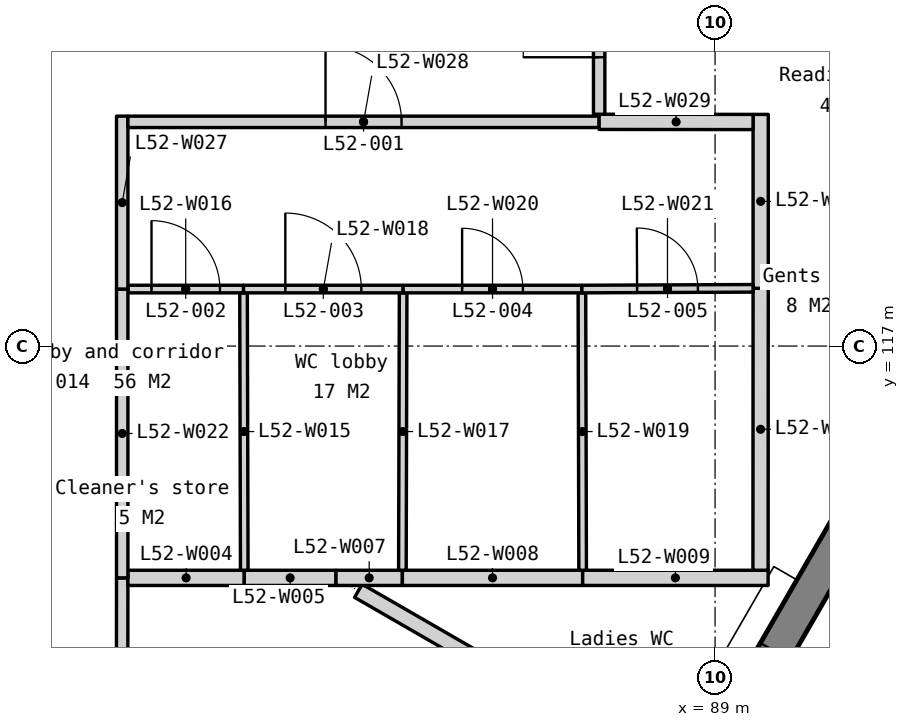
"""IFC4 building model, lengths in metres.
Left out: names, types, materials, properties, quantities, classifications, styles, units other than length and angle.
Written with IfcOpenShell. Run it as: python <this file> out.ifc"""

import sys

from ifc_helpers import new_model, si_unit, direction, frame, frame_2d, origin, place, context, subcontext, project, spatial, polyline, rectangle, outline, extrude, element, fill, save


model = new_model("IFC4")
c1 = context("Model", 3, precision=1e-05, world=origin(), true_north=direction((0.0, 1.0)))
c2 = subcontext(c1, "Body", "Model", "MODEL_VIEW")
j1 = project(units=[si_unit("LENGTHUNIT", "METRE"), si_unit("PLANEANGLEUNIT", "RADIAN")], contexts=[c1])
p1 = place(None, origin())
s1 = spatial("IfcSite", under=j1, at=p1, CompositionType="ELEMENT")
p2 = place(p1, origin())
s2 = spatial("IfcBuilding", under=s1, at=p2, CompositionType="ELEMENT")
p3 = place(p2, frame((0.0, 0.0, 207.5)))
s3 = spatial("IfcBuildingStorey", under=s2, at=p3, CompositionType="ELEMENT", Elevation=207.5)
p4 = place(p3, frame((81.505, 98.627, -0.15), z_axis=(0.0, 0.0, 1.0), x_axis=(0.500002199942, 0.866024133644, 0.0)))
e1 = element("IfcWall", 1, at=p4, inside=s3, PredefinedType="SOLIDWALL", context=c2, shape_type="SweptSolid", body=[
    extrude(outline(polyline([(38.729, 0.0), (38.729, 3.9), (0.0, 3.9), (0.0, 0.0), (38.729, 0.0)])), frame((0.0, 0.225, 0.0), z_axis=(0.0, -1.0, 0.0), x_axis=(1.0, 0.0, 0.0)), (0.0, 0.0, 1.0), 0.45),
])
p5 = place(p4, frame((2.791, 0.0, 0.95)))
e2 = element("IfcOpeningElement", 2, at=p5, cuts=e1, PredefinedType="OPENING", context=c2, shape_type="SweptSolid", body=[
    extrude(rectangle(XDim=1.8, YDim=2.2, at=frame_2d((0.9, 1.1))), frame((0.0, 0.235, 0.0), z_axis=(0.0, -1.0, 0.0), x_axis=(1.0, 0.0, 0.0)), (0.0, 0.0, 1.0), 0.47),
])
p6 = place(p4, frame((5.091, 0.0, 0.95)))
e3 = element("IfcOpeningElement", 3, at=p6, cuts=e1, PredefinedType="OPENING", context=c2, shape_type="SweptSolid", body=[
    extrude(rectangle(XDim=1.8, YDim=2.2, at=frame_2d((0.9, 1.1))), frame((0.0, 0.235, 0.0), z_axis=(0.0, -1.0, 0.0), x_axis=(1.0, 0.0, 0.0)), (0.0, 0.0, 1.0), 0.47),
])
p7 = place(p4, frame((12.473, 0.0, 0.95)))
e4 = element("IfcOpeningElement", 4, at=p7, cuts=e1, PredefinedType="OPENING", context=c2, shape_type="SweptSolid", body=[
    extrude(rectangle(XDim=1.8, YDim=2.2, at=frame_2d((0.9, 1.1))), frame((0.0, 0.235, 0.0), z_axis=(0.0, -1.0, 0.0), x_axis=(1.0, 0.0, 0.0)), (0.0, 0.0, 1.0), 0.47),
])
p8 = place(p4, frame((14.773, 0.0, 0.95)))
e5 = element("IfcOpeningElement", 5, at=p8, cuts=e1, PredefinedType="OPENING", context=c2, shape_type="SweptSolid", body=[
    extrude(rectangle(XDim=1.8, YDim=2.2, at=frame_2d((0.9, 1.1))), frame((0.0, 0.235, 0.0), z_axis=(0.0, -1.0, 0.0), x_axis=(1.0, 0.0, 0.0)), (0.0, 0.0, 1.0), 0.47),
])
p9 = place(p4, frame((22.156, 0.0, 0.95)))
e6 = element("IfcOpeningElement", 6, at=p9, cuts=e1, PredefinedType="OPENING", context=c2, shape_type="SweptSolid", body=[
    extrude(rectangle(XDim=1.8, YDim=2.2, at=frame_2d((0.9, 1.1))), frame((0.0, 0.235, 0.0), z_axis=(0.0, -1.0, 0.0), x_axis=(1.0, 0.0, 0.0)), (0.0, 0.0, 1.0), 0.47),
])
p10 = place(p4, frame((24.456, 0.0, 0.95)))
e7 = element("IfcOpeningElement", 7, at=p10, cuts=e1, PredefinedType="OPENING", context=c2, shape_type="SweptSolid", body=[
    extrude(rectangle(XDim=1.8, YDim=2.2, at=frame_2d((0.9, 1.1))), frame((0.0, 0.235, 0.0), z_axis=(0.0, -1.0, 0.0), x_axis=(1.0, 0.0, 0.0)), (0.0, 0.0, 1.0), 0.47),
])
p11 = place(p4, frame((31.838, 0.0, 0.95)))
e8 = element("IfcOpeningElement", 8, at=p11, cuts=e1, PredefinedType="OPENING", context=c2, shape_type="SweptSolid", body=[
    extrude(rectangle(XDim=1.8, YDim=2.2, at=frame_2d((0.9, 1.1))), frame((0.0, 0.235, 0.0), z_axis=(0.0, -1.0, 0.0), x_axis=(1.0, 0.0, 0.0)), (0.0, 0.0, 1.0), 0.47),
])
p12 = place(p4, frame((34.138, 0.0, 0.95)))
e9 = element("IfcOpeningElement", 9, at=p12, cuts=e1, PredefinedType="OPENING", context=c2, shape_type="SweptSolid", body=[
    extrude(rectangle(XDim=1.8, YDim=2.2, at=frame_2d((0.9, 1.1))), frame((0.0, 0.235, 0.0), z_axis=(0.0, -1.0, 0.0), x_axis=(1.0, 0.0, 0.0)), (0.0, 0.0, 1.0), 0.47),
])
p13 = place(p3, frame((81.198, 111.842, 0.0), z_axis=(0.0, 0.0, 1.0), x_axis=(0.000926461675, 0.999999570834, 0.0)))
e10 = element("IfcWall", 10, at=p13, inside=s3, PredefinedType="PARTITIONING", context=c2, shape_type="SweptSolid", body=[
    extrude(rectangle(XDim=2.108, YDim=0.15, at=frame_2d((1.054, 0.0))), origin(), (0.0, 0.0, 1.0), 3.75),
])
p14 = place(p3, frame((81.275, 113.95, 0.0), z_axis=(0.0, 0.0, 1.0), x_axis=(1.0, 0.0, 0.0)))
e11 = element("IfcWall", 11, at=p14, inside=s3, PredefinedType="PARTITIONING", context=c2, shape_type="SweptSolid", body=[
    extrude(rectangle(XDim=1.531, YDim=0.2, at=frame_2d((0.766, 0.0))), origin(), (0.0, 0.0, 1.0), 3.75),
])
p15 = place(p3, frame((82.806, 113.95, 0.0), z_axis=(0.0, 0.0, 1.0), x_axis=(1.0, 0.0, 0.0)))
e12 = element("IfcWall", 12, at=p15, inside=s3, PredefinedType="PARTITIONING", context=c2, shape_type="SweptSolid", body=[
    extrude(rectangle(XDim=1.207, YDim=0.2, at=frame_2d((0.604, 0.0))), origin(), (0.0, 0.0, 1.0), 3.75),
])
p16 = place(p3, frame((84.307, 113.78, 0.0), z_axis=(0.0, 0.0, 1.0), x_axis=(0.86601964755, -0.500009969958, 0.0)))
e13 = element("IfcWall", 13, at=p16, inside=s3, PredefinedType="PARTITIONING", context=c2, shape_type="SweptSolid", body=[
    extrude(rectangle(XDim=4.925, YDim=0.2, at=frame_2d((2.462, 0.0))), origin(), (0.0, 0.0, 1.0), 3.75),
])
p17 = place(p3, frame((84.013, 113.95, 0.0), z_axis=(0.0, 0.0, 1.0), x_axis=(1.0, 0.0, 0.0)))
e14 = element("IfcWall", 14, at=p17, inside=s3, PredefinedType="PARTITIONING", context=c2, shape_type="SweptSolid", body=[
    extrude(rectangle(XDim=0.873, YDim=0.2, at=frame_2d((0.437, 0.0))), origin(), (0.0, 0.0, 1.0), 3.75),
])
p18 = place(p3, frame((84.886, 113.95, 0.0), z_axis=(0.0, 0.0, 1.0), x_axis=(1.0, 0.0, 0.0)))
e15 = element("IfcWall", 15, at=p18, inside=s3, PredefinedType="PARTITIONING", context=c2, shape_type="SweptSolid", body=[
    extrude(rectangle(XDim=2.372, YDim=0.2, at=frame_2d((1.186, 0.0))), origin(), (0.0, 0.0, 1.0), 3.75),
])
p19 = place(p3, frame((87.258, 113.95, 0.0), z_axis=(0.0, 0.0, 1.0), x_axis=(1.0, 0.0, 0.0)))
e16 = element("IfcWall", 16, at=p19, inside=s3, PredefinedType="PARTITIONING", context=c2, shape_type="SweptSolid", body=[
    extrude(rectangle(XDim=2.44, YDim=0.2, at=frame_2d((1.22, 0.0))), origin(), (0.0, 0.0, 1.0), 3.75),
])
p20 = place(p3, frame((89.598, 114.05, 0.0), z_axis=(0.0, 0.0, 1.0), x_axis=(0.000526454257, 0.999999861423, 0.0)))
e17 = element("IfcWall", 17, at=p20, inside=s3, PredefinedType="PARTITIONING", context=c2, shape_type="SweptSolid", body=[
    extrude(rectangle(XDim=3.71, YDim=0.2, at=frame_2d((1.855, 0.0))), origin(), (0.0, 0.0, 1.0), 3.75),
])
p21 = place(p3, frame((89.6, 117.76, 0.0), z_axis=(0.0, 0.0, 1.0), x_axis=(0.0, 1.0, 0.0)))
e18 = element("IfcWall", 18, at=p21, inside=s3, PredefinedType="PARTITIONING", context=c2, shape_type="SweptSolid", body=[
    extrude(rectangle(XDim=2.288, YDim=0.2, at=frame_2d((1.144, 0.0))), origin(), (0.0, 0.0, 1.0), 3.75),
])
p22 = place(p3, frame((82.806, 114.05, 0.0), z_axis=(0.0, 0.0, 1.0), x_axis=(-0.002608686776, 0.999996597371, 0.0)))
e19 = element("IfcWall", 19, at=p22, inside=s3, PredefinedType="PARTITIONING", context=c2, shape_type="SweptSolid", body=[
    extrude(rectangle(XDim=3.65, YDim=0.1, at=frame_2d((1.825, 0.0))), origin(), (0.0, 0.0, 1.0), 3.75),
])
p23 = place(p3, frame((81.275, 117.75, 0.0), z_axis=(0.0, 0.0, 1.0), x_axis=(1.0, 0.0, 0.0)))
e20 = element("IfcWall", 20, at=p23, inside=s3, PredefinedType="PARTITIONING", context=c2, shape_type="SweptSolid", body=[
    extrude(rectangle(XDim=1.521, YDim=0.1, at=frame_2d((0.76, 0.0))), origin(), (0.0, 0.0, 1.0), 3.75),
])
p24 = place(p23, frame((0.311, 0.0, 0.0)))
e21 = element("IfcOpeningElement", 21, at=p24, cuts=e20, PredefinedType="OPENING", context=c2, shape_type="SweptSolid", body=[
    extrude(rectangle(XDim=0.9, YDim=2.1, at=frame_2d((0.45, 1.05))), frame((0.0, 0.06, 0.0), z_axis=(0.0, -1.0, 0.0), x_axis=(1.0, 0.0, 0.0)), (0.0, 0.0, 1.0), 0.12),
])
p25 = place(p3, frame((84.886, 114.05, 0.0), z_axis=(0.0, 0.0, 1.0), x_axis=(0.002608686776, 0.999996597371, 0.0)))
e22 = element("IfcWall", 22, at=p25, inside=s3, PredefinedType="PARTITIONING", context=c2, shape_type="SweptSolid", body=[
    extrude(rectangle(XDim=3.65, YDim=0.1, at=frame_2d((1.825, 0.0))), origin(), (0.0, 0.0, 1.0), 3.75),
])
p26 = place(p3, frame((82.796, 117.75, 0.0), z_axis=(0.0, 0.0, 1.0), x_axis=(1.0, 0.0, 0.0)))
e23 = element("IfcWall", 23, at=p26, inside=s3, PredefinedType="PARTITIONING", context=c2, shape_type="SweptSolid", body=[
    extrude(rectangle(XDim=2.1, YDim=0.1, at=frame_2d((1.05, 0.0))), origin(), (0.0, 0.0, 1.0), 3.75),
])
p27 = place(p26, frame((0.55, 0.0, 0.0)))
e24 = element("IfcOpeningElement", 24, at=p27, cuts=e23, PredefinedType="OPENING", context=c2, shape_type="SweptSolid", body=[
    extrude(rectangle(XDim=1.0, YDim=2.1, at=frame_2d((0.5, 1.05))), frame((0.0, 0.06, 0.0), z_axis=(0.0, -1.0, 0.0), x_axis=(1.0, 0.0, 0.0)), (0.0, 0.0, 1.0), 0.12),
])
p28 = place(p3, frame((87.258, 114.05, 0.0), z_axis=(0.0, 0.0, 1.0), x_axis=(-0.002675575707, 0.999996420641, 0.0)))
e25 = element("IfcWall", 25, at=p28, inside=s3, PredefinedType="PARTITIONING", context=c2, shape_type="SweptSolid", body=[
    extrude(rectangle(XDim=3.65, YDim=0.1, at=frame_2d((1.825, 0.0))), origin(), (0.0, 0.0, 1.0), 3.75),
])
p29 = place(p3, frame((84.896, 117.75, 0.0), z_axis=(0.0, 0.0, 1.0), x_axis=(1.0, 0.0, 0.0)))
e26 = element("IfcWall", 26, at=p29, inside=s3, PredefinedType="PARTITIONING", context=c2, shape_type="SweptSolid", body=[
    extrude(rectangle(XDim=2.352, YDim=0.1, at=frame_2d((1.176, 0.0))), origin(), (0.0, 0.0, 1.0), 3.75),
])
p30 = place(p29, frame((0.776, 0.0, 0.0)))
e27 = element("IfcOpeningElement", 27, at=p30, cuts=e26, PredefinedType="OPENING", context=c2, shape_type="SweptSolid", body=[
    extrude(rectangle(XDim=0.8, YDim=2.1, at=frame_2d((0.4, 1.05))), frame((0.0, 0.06, 0.0), z_axis=(0.0, -1.0, 0.0), x_axis=(1.0, 0.0, 0.0)), (0.0, 0.0, 1.0), 0.12),
])
p31 = place(p3, frame((87.248, 117.75, 0.0), z_axis=(0.0, 0.0, 1.0), x_axis=(0.999991061702, 0.004228062815, 0.0)))
e28 = element("IfcWall", 28, at=p31, inside=s3, PredefinedType="PARTITIONING", context=c2, shape_type="SweptSolid", body=[
    extrude(rectangle(XDim=2.252, YDim=0.1, at=frame_2d((1.126, 0.0))), origin(), (0.0, 0.0, 1.0), 3.75),
])
p32 = place(p31, frame((0.726, 0.0, 0.0)))
e29 = element("IfcOpeningElement", 29, at=p32, cuts=e28, PredefinedType="OPENING", context=c2, shape_type="SweptSolid", body=[
    extrude(rectangle(XDim=0.8, YDim=2.1, at=frame_2d((0.4, 1.05))), frame((0.0, 0.06, 0.0), z_axis=(0.0, -1.0, 0.0), x_axis=(1.0, 0.0, 0.0)), (0.0, 0.0, 1.0), 0.12),
])
p33 = place(p3, frame((81.2, 113.95, 0.0), z_axis=(0.0, 0.0, 1.0), x_axis=(0.0, 1.0, 0.0)))
e30 = element("IfcWall", 30, at=p33, inside=s3, PredefinedType="PARTITIONING", context=c2, shape_type="SweptSolid", body=[
    extrude(rectangle(XDim=3.8, YDim=0.15, at=frame_2d((1.9, 0.0))), origin(), (0.0, 0.0, 1.0), 3.75),
])
p34 = place(p3, frame((81.2, 117.75, 0.0), z_axis=(0.0, 0.0, 1.0), x_axis=(0.0, 1.0, 0.0)))
e31 = element("IfcWall", 31, at=p34, inside=s3, PredefinedType="PARTITIONING", context=c2, shape_type="SweptSolid", body=[
    extrude(rectangle(XDim=2.275, YDim=0.15, at=frame_2d((1.137, 0.0))), origin(), (0.0, 0.0, 1.0), 3.75),
])
p35 = place(p3, frame((81.275, 119.95, 0.0), z_axis=(0.0, 0.0, 1.0), x_axis=(1.0, 0.0, 0.0)))
e32 = element("IfcWall", 32, at=p35, inside=s3, PredefinedType="PARTITIONING", context=c2, shape_type="SweptSolid", body=[
    extrude(rectangle(XDim=6.2, YDim=0.15, at=frame_2d((3.1, 0.0))), origin(), (0.0, 0.0, 1.0), 3.75),
])
p36 = place(p35, frame((2.6, 0.0, 0.0)))
e33 = element("IfcOpeningElement", 33, at=p36, cuts=e32, PredefinedType="OPENING", context=c2, shape_type="SweptSolid", body=[
    extrude(rectangle(XDim=1.0, YDim=2.1, at=frame_2d((0.5, 1.05))), frame((0.0, 0.085, 0.0), z_axis=(0.0, -1.0, 0.0), x_axis=(1.0, 0.0, 0.0)), (0.0, 0.0, 1.0), 0.17),
])
p37 = place(p3, frame((87.475, 119.95, 0.0), z_axis=(0.0, 0.0, 1.0), x_axis=(0.999999534819, -0.00096455224, 0.0)))
e34 = element("IfcWall", 34, at=p37, inside=s3, PredefinedType="PARTITIONING", context=c2, shape_type="SweptSolid", body=[
    extrude(rectangle(XDim=2.025, YDim=0.2, at=frame_2d((1.012, 0.0))), origin(), (0.0, 0.0, 1.0), 3.75),
])
p38 = place(p3, frame((87.475, 120.05, 0.0), z_axis=(0.0, 0.0, 1.0), x_axis=(0.0, 1.0, 0.0)))
e35 = element("IfcWall", 35, at=p38, inside=s3, PredefinedType="PARTITIONING", context=c2, shape_type="SweptSolid", body=[
    extrude(rectangle(XDim=2.5, YDim=0.15, at=frame_2d((1.25, 0.0))), origin(), (0.0, 0.0, 1.0), 3.75),
])
p39 = place(p38, frame((0.75, 0.0, 0.0)))
e36 = element("IfcOpeningElement", 36, at=p39, cuts=e35, PredefinedType="OPENING", context=c2, shape_type="SweptSolid", body=[
    extrude(rectangle(XDim=1.0, YDim=2.1, at=frame_2d((0.5, 1.05))), frame((0.0, 0.085, 0.0), z_axis=(0.0, -1.0, 0.0), x_axis=(1.0, 0.0, 0.0)), (0.0, 0.0, 1.0), 0.17),
])
p40 = place(p36, origin())
e37 = element("IfcDoor", 37, at=p40, inside=s3, OperationType="SINGLE_SWING_LEFT", PredefinedType="DOOR", context=c2, shape_type="SweptSolid", body=[
    extrude(rectangle(XDim=1.0, YDim=2.1, at=frame_2d((0.5, 1.05))), frame((0.0, 0.025, 0.0), z_axis=(0.0, -1.0, 0.0), x_axis=(1.0, 0.0, 0.0)), (0.0, 0.0, 1.0), 0.05),
])
fill(e33, e37)
p41 = place(p24, origin())
e38 = element("IfcDoor", 38, at=p41, inside=s3, OperationType="SINGLE_SWING_LEFT", PredefinedType="DOOR", context=c2, shape_type="SweptSolid", body=[
    extrude(rectangle(XDim=0.9, YDim=2.1, at=frame_2d((0.45, 1.05))), frame((0.0, 0.025, 0.0), z_axis=(0.0, -1.0, 0.0), x_axis=(1.0, 0.0, 0.0)), (0.0, 0.0, 1.0), 0.05),
])
fill(e21, e38)
p42 = place(p27, origin())
e39 = element("IfcDoor", 39, at=p42, inside=s3, OperationType="SINGLE_SWING_LEFT", PredefinedType="DOOR", context=c2, shape_type="SweptSolid", body=[
    extrude(rectangle(XDim=1.0, YDim=2.1, at=frame_2d((0.5, 1.05))), frame((0.0, 0.025, 0.0), z_axis=(0.0, -1.0, 0.0), x_axis=(1.0, 0.0, 0.0)), (0.0, 0.0, 1.0), 0.05),
])
fill(e24, e39)
p43 = place(p30, origin())
e40 = element("IfcDoor", 40, at=p43, inside=s3, OperationType="SINGLE_SWING_LEFT", PredefinedType="DOOR", context=c2, shape_type="SweptSolid", body=[
    extrude(rectangle(XDim=0.8, YDim=2.1, at=frame_2d((0.4, 1.05))), frame((0.0, 0.025, 0.0), z_axis=(0.0, -1.0, 0.0), x_axis=(1.0, 0.0, 0.0)), (0.0, 0.0, 1.0), 0.05),
])
fill(e27, e40)
p44 = place(p32, origin())
e41 = element("IfcDoor", 41, at=p44, inside=s3, OperationType="SINGLE_SWING_LEFT", PredefinedType="DOOR", context=c2, shape_type="SweptSolid", body=[
    extrude(rectangle(XDim=0.8, YDim=2.1, at=frame_2d((0.4, 1.05))), frame((0.0, 0.025, 0.0), z_axis=(0.0, -1.0, 0.0), x_axis=(1.0, 0.0, 0.0)), (0.0, 0.0, 1.0), 0.05),
])
fill(e29, e41)
p45 = place(p39, origin())
e42 = element("IfcDoor", 42, at=p45, inside=s3, OperationType="SINGLE_SWING_LEFT", PredefinedType="DOOR", context=c2, shape_type="SweptSolid", body=[
    extrude(rectangle(XDim=1.0, YDim=2.1, at=frame_2d((0.5, 1.05))), frame((0.0, 0.025, 0.0), z_axis=(0.0, -1.0, 0.0), x_axis=(1.0, 0.0, 0.0)), (0.0, 0.0, 1.0), 0.05),
])
fill(e36, e42)
save(model, sys.argv[1])
